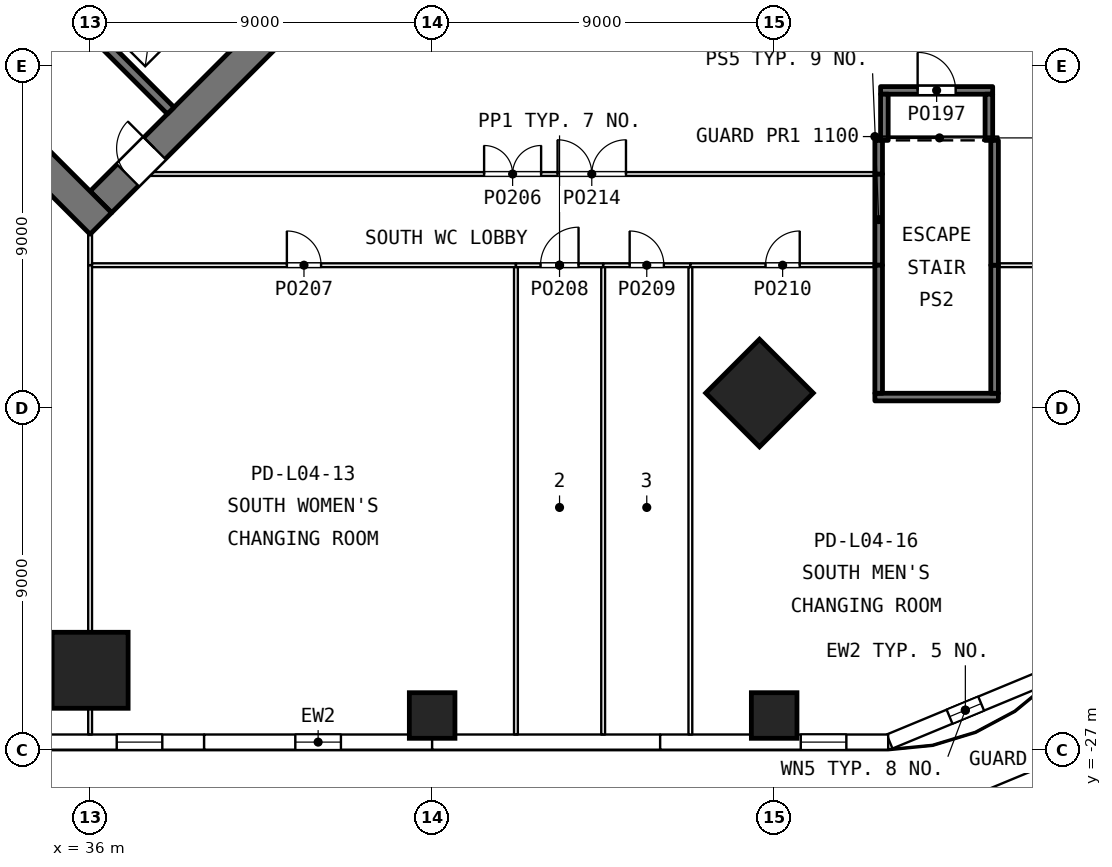
"""IFC4 building model, lengths in metres.
Left out: names, types, materials, properties, quantities, classifications, styles, units other than length and angle.
Written with IfcOpenShell. Run it as: python <this file> out.ifc"""

import sys

from ifc_helpers import new_model, si_unit, direction, frame, frame_2d, origin, origin_2d, place, context, subcontext, project, spatial, rectangle, extrude, element, fill, save


model = new_model("IFC4")
c1 = context("Model", 3, precision=1e-05, world=origin(), true_north=direction((0.0, 1.0)))
c2 = subcontext(c1, "Body", "Model", "MODEL_VIEW")
j1 = project(units=[si_unit("LENGTHUNIT", "METRE"), si_unit("PLANEANGLEUNIT", "RADIAN")], contexts=[c1])
p1 = place(None, origin())
s1 = spatial("IfcSite", under=j1, at=p1, CompositionType="ELEMENT")
p2 = place(p1, origin())
s2 = spatial("IfcBuilding", under=s1, at=p2, CompositionType="ELEMENT")
p3 = place(p2, frame((0.0, 0.0, 22.8)))
s3 = spatial("IfcBuildingStorey", under=s2, at=p3, CompositionType="ELEMENT", Elevation=22.8)
for number, where, z_axis, x_axis in (
    (1, (45.0, -26.1, 0.0), (0.0, 0.0, 1.0), (1.0, 0.0, 0.0)),
    (2, (54.0, -26.1, 0.0), (0.0, 0.0, 1.0), (1.0, 0.0, 0.0)),
):
    element("IfcColumn", number, at=place(p3, frame(where, z_axis=z_axis, x_axis=x_axis)), inside=s3, PredefinedType="COLUMN", context=c2, shape_type="SweptSolid", body=[
        extrude(rectangle(XDim=1.2, YDim=1.2, at=origin_2d()), origin(), (0.0, 0.0, 1.0), 4.8),
    ])
for number, where, z_axis, x_axis in (
    (3, (36.0, -24.91, 0.0), (0.0, 0.0, 1.0), (0.0, -1.0, 0.0)),
    (4, (53.614, -17.614, 0.0), (0.0, 0.0, 1.0), (0.707, -0.707, 0.0)),
):
    element("IfcColumn", number, at=place(p3, frame(where, z_axis=z_axis, x_axis=x_axis)), inside=s3, PredefinedType="COLUMN", context=c2, shape_type="SweptSolid", body=[
        extrude(rectangle(XDim=2.0, YDim=2.0, at=origin_2d()), origin(), (0.0, 0.0, 1.0), 4.8),
    ])
p4 = place(p3, frame((57.037, -26.785, 0.0), z_axis=(0.0, 0.0, 1.0), x_axis=(0.923854820772, 0.382743086333, 0.0)))
e5 = element("IfcWall", 5, at=p4, inside=s3, PredefinedType="SOLIDWALL", context=c2, shape_type="SweptSolid", body=[
    extrude(rectangle(XDim=4.316, YDim=0.4, at=frame_2d((2.158, 0.0))), origin(), (0.0, 0.0, 1.0), 4.5),
])
p5 = place(p4, frame((1.708, 0.0, 1.0)))
e6 = element("IfcOpeningElement", 6, at=p5, cuts=e5, PredefinedType="OPENING", context=c2, shape_type="SweptSolid", body=[
    extrude(rectangle(XDim=0.9, YDim=2.4, at=frame_2d((0.45, 1.2))), frame((0.0, 0.21, 0.0), z_axis=(0.0, -1.0, 0.0), x_axis=(1.0, 0.0, 0.0)), (0.0, 0.0, 1.0), 0.42),
])
p6 = place(p3, frame((33.0, -26.8, 0.0), z_axis=(0.0, 0.0, 1.0), x_axis=(1.0, 0.0, 0.0)))
e7 = element("IfcWall", 7, at=p6, inside=s3, PredefinedType="SOLIDWALL", context=c2, shape_type="SweptSolid", body=[
    extrude(rectangle(XDim=6.0, YDim=0.4, at=frame_2d((3.0, 0.0))), origin(), (0.0, 0.0, 1.0), 4.5),
])
p7 = place(p6, frame((3.7, 0.0, 1.1)))
e8 = element("IfcOpeningElement", 8, at=p7, cuts=e7, PredefinedType="OPENING", context=c2, shape_type="SweptSolid", body=[
    extrude(rectangle(XDim=1.2, YDim=1.8, at=frame_2d((0.6, 0.9))), frame((0.0, 0.21, 0.0), z_axis=(0.0, -1.0, 0.0), x_axis=(1.0, 0.0, 0.0)), (0.0, 0.0, 1.0), 0.42),
])
p8 = place(p3, frame((39.0, -26.8, 0.0), z_axis=(0.0, 0.0, 1.0), x_axis=(1.0, 0.0, 0.0)))
e9 = element("IfcWall", 9, at=p8, inside=s3, PredefinedType="SOLIDWALL", context=c2, shape_type="SweptSolid", body=[
    extrude(rectangle(XDim=6.0, YDim=0.4, at=frame_2d((3.0, 0.0))), origin(), (0.0, 0.0, 1.0), 4.5),
])
p9 = place(p8, frame((2.4, 0.0, 1.1)))
e10 = element("IfcOpeningElement", 10, at=p9, cuts=e9, PredefinedType="OPENING", context=c2, shape_type="SweptSolid", body=[
    extrude(rectangle(XDim=1.2, YDim=1.8, at=frame_2d((0.6, 0.9))), frame((0.0, 0.21, 0.0), z_axis=(0.0, -1.0, 0.0), x_axis=(1.0, 0.0, 0.0)), (0.0, 0.0, 1.0), 0.42),
])
p10 = place(p3, frame((45.0, -26.8, 0.0), z_axis=(0.0, 0.0, 1.0), x_axis=(1.0, 0.0, 0.0)))
e11 = element("IfcWall", 11, at=p10, inside=s3, PredefinedType="SOLIDWALL", context=c2, shape_type="SweptSolid", body=[
    extrude(rectangle(XDim=6.0, YDim=0.4, at=frame_2d((3.0, 0.0))), origin(), (0.0, 0.0, 1.0), 4.5),
])
p11 = place(p3, frame((51.0, -26.8, 0.0), z_axis=(0.0, 0.0, 1.0), x_axis=(1.0, 0.0, 0.0)))
e12 = element("IfcWall", 12, at=p11, inside=s3, PredefinedType="SOLIDWALL", context=c2, shape_type="SweptSolid", body=[
    extrude(rectangle(XDim=6.0, YDim=0.4, at=frame_2d((3.0, 0.0))), origin(), (0.0, 0.0, 1.0), 4.5),
])
p12 = place(p11, frame((3.7, 0.0, 1.1)))
e13 = element("IfcOpeningElement", 13, at=p12, cuts=e12, PredefinedType="OPENING", context=c2, shape_type="SweptSolid", body=[
    extrude(rectangle(XDim=1.2, YDim=1.8, at=frame_2d((0.6, 0.9))), frame((0.0, 0.21, 0.0), z_axis=(0.0, -1.0, 0.0), x_axis=(1.0, 0.0, 0.0)), (0.0, 0.0, 1.0), 0.42),
])
p13 = place(p3, frame((36.283, -12.586, 0.0), z_axis=(0.0, 0.0, 1.0), x_axis=(0.707106781187, 0.707106781187, 0.0)))
e14 = element("IfcWall", 14, at=p13, inside=s3, PredefinedType="SHEAR", context=c2, shape_type="SweptSolid", body=[
    extrude(rectangle(XDim=17.4, YDim=0.8, at=frame_2d((8.7, 0.0))), origin(), (0.0, 0.0, 1.0), 4.5),
])
p14 = place(p13, frame((7.3, 0.0, 0.0)))
e15 = element("IfcOpeningElement", 15, at=p14, cuts=e14, PredefinedType="OPENING", context=c2, shape_type="SweptSolid", body=[
    extrude(rectangle(XDim=1.2, YDim=2.1, at=frame_2d((0.6, 1.05))), frame((0.0, 0.41, 0.0), z_axis=(0.0, -1.0, 0.0), x_axis=(1.0, 0.0, 0.0)), (0.0, 0.0, 1.0), 0.82),
])
p15 = place(p13, frame((1.0, 0.0, 0.0)))
e16 = element("IfcOpeningElement", 16, at=p15, cuts=e14, PredefinedType="OPENING", context=c2, shape_type="SweptSolid", body=[
    extrude(rectangle(XDim=1.0, YDim=2.1, at=frame_2d((0.5, 1.05))), frame((0.0, 0.41, 0.0), z_axis=(0.0, -1.0, 0.0), x_axis=(1.0, 0.0, 0.0)), (0.0, 0.0, 1.0), 0.82),
])
p16 = place(p3, frame((33.207, -9.51, 0.0), z_axis=(0.0, 0.0, 1.0), x_axis=(0.707106781187, 0.707106781187, 0.0)))
e17 = element("IfcWall", 17, at=p16, inside=s3, PredefinedType="SHEAR", context=c2, shape_type="SweptSolid", body=[
    extrude(rectangle(XDim=17.4, YDim=0.25, at=frame_2d((8.7, 0.0))), origin(), (0.0, 0.0, 1.0), 4.5),
])
p17 = place(p3, frame((36.283, -13.152, 0.0), z_axis=(0.0, 0.0, 1.0), x_axis=(-0.707106781187, 0.707106781187, 0.0)))
e18 = element("IfcWall", 18, at=p17, inside=s3, PredefinedType="SHEAR", context=c2, shape_type="SweptSolid", body=[
    extrude(rectangle(XDim=19.0, YDim=0.8, at=frame_2d((9.5, 0.0))), origin(), (0.0, 0.0, 1.0), 4.5),
])
p18 = place(p17, frame((8.3, 0.0, 0.0)))
e19 = element("IfcOpeningElement", 19, at=p18, cuts=e18, PredefinedType="OPENING", context=c2, shape_type="SweptSolid", body=[
    extrude(rectangle(XDim=2.4, YDim=2.1, at=frame_2d((1.2, 1.05))), frame((0.0, 0.41, 0.0), z_axis=(0.0, -1.0, 0.0), x_axis=(1.0, 0.0, 0.0)), (0.0, 0.0, 1.0), 0.82),
])
p19 = place(p3, frame((38.121, -10.182, 0.0), z_axis=(0.0, 0.0, 1.0), x_axis=(-0.707138693938, 0.707074866995, 0.0)))
e20 = element("IfcWall", 20, at=p19, inside=s3, PredefinedType="SHEAR", context=c2, shape_type="SweptSolid", body=[
    extrude(rectangle(XDim=3.825, YDim=0.25, at=frame_2d((1.913, 0.0))), origin(), (0.0, 0.0, 1.0), 4.5),
])
p20 = place(p3, frame((56.75, -14.25, 0.0), z_axis=(0.0, 0.0, 1.0), x_axis=(0.0, 1.0, 0.0)))
e21 = element("IfcWall", 21, at=p20, inside=s3, PredefinedType="SOLIDWALL", context=c2, shape_type="SweptSolid", body=[
    extrude(rectangle(XDim=2.4, YDim=0.2, at=frame_2d((1.2, 0.0))), origin(), (0.0, 0.0, 1.0), 4.5),
])
p21 = place(p3, frame((56.65, -17.72, 0.0), z_axis=(0.0, 0.0, 1.0), x_axis=(1.0, 0.0, 0.0)))
e22 = element("IfcWall", 22, at=p21, inside=s3, PredefinedType="SOLIDWALL", context=c2, shape_type="SweptSolid", body=[
    extrude(rectangle(XDim=3.25, YDim=0.2, at=frame_2d((1.625, 0.0))), origin(), (0.0, 0.0, 1.0), 4.5),
])
for number, where, z_axis, x_axis in (
    (23, (56.75, -17.62, 0.0), (0.0, 0.0, 1.0), (0.0, 1.0, 0.0)),
    (24, (59.8, -17.62, 0.0), (0.0, 0.0, 1.0), (0.0, 1.0, 0.0)),
):
    element("IfcWall", number, at=place(p3, frame(where, z_axis=z_axis, x_axis=x_axis)), inside=s3, PredefinedType="SOLIDWALL", context=c2, shape_type="SweptSolid", body=[
        extrude(rectangle(XDim=3.37, YDim=0.2, at=frame_2d((1.685, 0.0))), origin(), (0.0, 0.0, 1.0), 4.5),
    ])
p22 = place(p3, frame((56.8, -9.65, 0.0), z_axis=(0.0, 0.0, 1.0), x_axis=(1.0, 0.0, 0.0)))
e25 = element("IfcWall", 25, at=p22, inside=s3, PredefinedType="SOLIDWALL", context=c2, shape_type="SweptSolid", body=[
    extrude(rectangle(XDim=2.95, YDim=0.2, at=frame_2d((1.475, 0.0))), origin(), (0.0, 0.0, 1.0), 4.5),
])
p23 = place(p22, frame((0.975, 0.0, 0.0)))
e26 = element("IfcOpeningElement", 26, at=p23, cuts=e25, PredefinedType="OPENING", context=c2, shape_type="SweptSolid", body=[
    extrude(rectangle(XDim=1.0, YDim=2.1, at=frame_2d((0.5, 1.05))), frame((0.0, 0.11, 0.0), z_axis=(0.0, -1.0, 0.0), x_axis=(1.0, 0.0, 0.0)), (0.0, 0.0, 1.0), 0.22),
])
p24 = place(p3, frame((56.75, -11.85, 0.0), z_axis=(0.0, 0.0, 1.0), x_axis=(0.0, 1.0, 0.0)))
e27 = element("IfcWall", 27, at=p24, inside=s3, PredefinedType="SOLIDWALL", context=c2, shape_type="SweptSolid", body=[
    extrude(rectangle(XDim=0.885, YDim=0.2, at=frame_2d((0.442, 0.0))), origin(), (0.0, 0.0, 1.0), 4.5),
])
for number, where, z_axis, x_axis in (
    (28, (56.9, -10.965, 0.0), (0.0, 0.0, 1.0), (0.0, 1.0, 0.0)),
    (29, (59.65, -10.965, 0.0), (0.0, 0.0, 1.0), (0.0, 1.0, 0.0)),
):
    element("IfcWall", number, at=place(p3, frame(where, z_axis=z_axis, x_axis=x_axis)), inside=s3, PredefinedType="SOLIDWALL", context=c2, shape_type="SweptSolid", body=[
        extrude(rectangle(XDim=1.215, YDim=0.2, at=frame_2d((0.607, 0.0))), origin(), (0.0, 0.0, 1.0), 4.5),
    ])
p25 = place(p3, frame((59.8, -14.25, 0.0), z_axis=(0.0, 0.0, 1.0), x_axis=(0.0, 1.0, 0.0)))
e30 = element("IfcWall", 30, at=p25, inside=s3, PredefinedType="SOLIDWALL", context=c2, shape_type="SweptSolid", body=[
    extrude(rectangle(XDim=3.285, YDim=0.2, at=frame_2d((1.643, 0.0))), origin(), (0.0, 0.0, 1.0), 4.5),
])
p26 = place(p3, frame((36.0, -14.25, 0.0), z_axis=(0.0, 0.0, 1.0), x_axis=(0.0, 1.0, 0.0)))
e31 = element("IfcWall", 31, at=p26, inside=s3, PredefinedType="PARTITIONING", context=c2, shape_type="SweptSolid", body=[
    extrude(rectangle(XDim=0.815, YDim=0.1, at=frame_2d((0.407, 0.0))), origin(), (0.0, 0.0, 1.0), 4.5),
])
p27 = place(p3, frame((36.0, -26.6, 0.0), z_axis=(0.0, 0.0, 1.0), x_axis=(0.0, 1.0, 0.0)))
e32 = element("IfcWall", 32, at=p27, inside=s3, PredefinedType="PARTITIONING", context=c2, shape_type="SweptSolid", body=[
    extrude(rectangle(XDim=12.35, YDim=0.1, at=frame_2d((6.175, 0.0))), origin(), (0.0, 0.0, 1.0), 3.9),
])
p28 = place(p3, frame((36.05, -14.25, 0.0), z_axis=(0.0, 0.0, 1.0), x_axis=(1.0, 0.0, 0.0)))
e33 = element("IfcWall", 33, at=p28, inside=s3, PredefinedType="PARTITIONING", context=c2, shape_type="SweptSolid", body=[
    extrude(rectangle(XDim=11.155, YDim=0.1, at=frame_2d((5.578, 0.0))), origin(), (0.0, 0.0, 1.0), 4.5),
])
p29 = place(p28, frame((5.127, 0.0, 0.0)))
e34 = element("IfcOpeningElement", 34, at=p29, cuts=e33, PredefinedType="OPENING", context=c2, shape_type="SweptSolid", body=[
    extrude(rectangle(XDim=0.9, YDim=2.1, at=frame_2d((0.45, 1.05))), frame((0.0, 0.06, 0.0), z_axis=(0.0, -1.0, 0.0), x_axis=(1.0, 0.0, 0.0)), (0.0, 0.0, 1.0), 0.12),
])
p30 = place(p3, frame((47.205, -14.25, 0.0), z_axis=(0.0, 0.0, 1.0), x_axis=(1.0, 0.0, 0.0)))
e35 = element("IfcWall", 35, at=p30, inside=s3, PredefinedType="PARTITIONING", context=c2, shape_type="SweptSolid", body=[
    extrude(rectangle(XDim=2.295, YDim=0.1, at=frame_2d((1.147, 0.0))), origin(), (0.0, 0.0, 1.0), 4.5),
])
p31 = place(p30, frame((0.647, 0.0, 0.0)))
e36 = element("IfcOpeningElement", 36, at=p31, cuts=e35, PredefinedType="OPENING", context=c2, shape_type="SweptSolid", body=[
    extrude(rectangle(XDim=1.0, YDim=2.1, at=frame_2d((0.5, 1.05))), frame((0.0, 0.06, 0.0), z_axis=(0.0, -1.0, 0.0), x_axis=(1.0, 0.0, 0.0)), (0.0, 0.0, 1.0), 0.12),
])
p32 = place(p3, frame((49.5, -14.25, 0.0), z_axis=(0.0, 0.0, 1.0), x_axis=(1.0, 0.0, 0.0)))
e37 = element("IfcWall", 37, at=p32, inside=s3, PredefinedType="PARTITIONING", context=c2, shape_type="SweptSolid", body=[
    extrude(rectangle(XDim=2.295, YDim=0.1, at=frame_2d((1.147, 0.0))), origin(), (0.0, 0.0, 1.0), 4.5),
])
p33 = place(p32, frame((0.698, 0.0, 0.0)))
e38 = element("IfcOpeningElement", 38, at=p33, cuts=e37, PredefinedType="OPENING", context=c2, shape_type="SweptSolid", body=[
    extrude(rectangle(XDim=0.9, YDim=2.1, at=frame_2d((0.45, 1.05))), frame((0.0, 0.06, 0.0), z_axis=(0.0, -1.0, 0.0), x_axis=(1.0, 0.0, 0.0)), (0.0, 0.0, 1.0), 0.12),
])
p34 = place(p3, frame((51.795, -14.25, 0.0), z_axis=(0.0, 0.0, 1.0), x_axis=(1.0, 0.0, 0.0)))
e39 = element("IfcWall", 39, at=p34, inside=s3, PredefinedType="PARTITIONING", context=c2, shape_type="SweptSolid", body=[
    extrude(rectangle(XDim=4.855, YDim=0.1, at=frame_2d((2.427, 0.0))), origin(), (0.0, 0.0, 1.0), 4.5),
])
p35 = place(p34, frame((1.978, 0.0, 0.0)))
e40 = element("IfcOpeningElement", 40, at=p35, cuts=e39, PredefinedType="OPENING", context=c2, shape_type="SweptSolid", body=[
    extrude(rectangle(XDim=0.9, YDim=2.1, at=frame_2d((0.45, 1.05))), frame((0.0, 0.06, 0.0), z_axis=(0.0, -1.0, 0.0), x_axis=(1.0, 0.0, 0.0)), (0.0, 0.0, 1.0), 0.12),
])
p36 = place(p3, frame((37.585, -11.85, 0.0), z_axis=(0.0, 0.0, 1.0), x_axis=(1.0, 0.0, 0.0)))
e41 = element("IfcWall", 41, at=p36, inside=s3, PredefinedType="PARTITIONING", context=c2, shape_type="SweptSolid", body=[
    extrude(rectangle(XDim=19.065, YDim=0.1, at=frame_2d((9.532, 0.0))), origin(), (0.0, 0.0, 1.0), 4.5),
])
p37 = place(p36, frame((8.782, 0.0, 0.0)))
e42 = element("IfcOpeningElement", 42, at=p37, cuts=e41, PredefinedType="OPENING", context=c2, shape_type="SweptSolid", body=[
    extrude(rectangle(XDim=1.5, YDim=2.1, at=frame_2d((0.75, 1.05))), frame((0.0, 0.06, 0.0), z_axis=(0.0, -1.0, 0.0), x_axis=(1.0, 0.0, 0.0)), (0.0, 0.0, 1.0), 0.12),
])
p38 = place(p36, frame((10.716, 0.0, 0.0)))
e43 = element("IfcOpeningElement", 43, at=p38, cuts=e41, PredefinedType="OPENING", context=c2, shape_type="SweptSolid", body=[
    extrude(rectangle(XDim=1.8, YDim=2.1, at=frame_2d((0.9, 1.05))), frame((0.0, 0.06, 0.0), z_axis=(0.0, -1.0, 0.0), x_axis=(1.0, 0.0, 0.0)), (0.0, 0.0, 1.0), 0.12),
])
for number, where, z_axis, x_axis in (
    (44, (47.205, -26.6, 0.0), (0.0, 0.0, 1.0), (0.0, 1.0, 0.0)),
    (45, (49.5, -26.6, 0.0), (0.0, 0.0, 1.0), (0.0, 1.0, 0.0)),
    (46, (51.795, -26.6, 0.0), (0.0, 0.0, 1.0), (0.0, 1.0, 0.0)),
):
    element("IfcWall", number, at=place(p3, frame(where, z_axis=z_axis, x_axis=x_axis)), inside=s3, PredefinedType="PARTITIONING", context=c2, shape_type="SweptSolid", body=[
        extrude(rectangle(XDim=12.3, YDim=0.1, at=frame_2d((6.15, 0.0))), origin(), (0.0, 0.0, 1.0), 4.5),
    ])
p39 = place(p3, frame((59.9, -14.25, 0.0), z_axis=(0.0, 0.0, 1.0), x_axis=(1.0, 0.0, 0.0)))
e47 = element("IfcWall", 47, at=p39, inside=s3, PredefinedType="PARTITIONING", context=c2, shape_type="SweptSolid", body=[
    extrude(rectangle(XDim=2.7, YDim=0.1, at=frame_2d((1.35, 0.0))), origin(), (0.0, 0.0, 1.0), 4.5),
])
p40 = place(p5, origin())
e48 = element("IfcWindow", 48, at=p40, inside=s3, PartitioningType="SINGLE_PANEL", PredefinedType="WINDOW", context=c2, shape_type="SweptSolid", body=[
    extrude(rectangle(XDim=0.9, YDim=2.4, at=frame_2d((0.45, 1.2))), frame((0.0, 0.03, 0.0), z_axis=(0.0, -1.0, 0.0), x_axis=(1.0, 0.0, 0.0)), (0.0, 0.0, 1.0), 0.06),
])
fill(e6, e48)
p41 = place(p7, origin())
e49 = element("IfcWindow", 49, at=p41, inside=s3, PartitioningType="SINGLE_PANEL", PredefinedType="WINDOW", context=c2, shape_type="SweptSolid", body=[
    extrude(rectangle(XDim=1.2, YDim=1.8, at=frame_2d((0.6, 0.9))), frame((0.0, 0.03, 0.0), z_axis=(0.0, -1.0, 0.0), x_axis=(1.0, 0.0, 0.0)), (0.0, 0.0, 1.0), 0.06),
])
fill(e8, e49)
p42 = place(p9, origin())
e50 = element("IfcWindow", 50, at=p42, inside=s3, PartitioningType="SINGLE_PANEL", PredefinedType="WINDOW", context=c2, shape_type="SweptSolid", body=[
    extrude(rectangle(XDim=1.2, YDim=1.8, at=frame_2d((0.6, 0.9))), frame((0.0, 0.03, 0.0), z_axis=(0.0, -1.0, 0.0), x_axis=(1.0, 0.0, 0.0)), (0.0, 0.0, 1.0), 0.06),
])
fill(e10, e50)
p43 = place(p12, origin())
e51 = element("IfcWindow", 51, at=p43, inside=s3, PartitioningType="SINGLE_PANEL", PredefinedType="WINDOW", context=c2, shape_type="SweptSolid", body=[
    extrude(rectangle(XDim=1.2, YDim=1.8, at=frame_2d((0.6, 0.9))), frame((0.0, 0.03, 0.0), z_axis=(0.0, -1.0, 0.0), x_axis=(1.0, 0.0, 0.0)), (0.0, 0.0, 1.0), 0.06),
])
fill(e13, e51)
p44 = place(p15, origin())
e52 = element("IfcDoor", 52, at=p44, inside=s3, OperationType="SINGLE_SWING_RIGHT", PredefinedType="DOOR", context=c2, shape_type="SweptSolid", body=[
    extrude(rectangle(XDim=1.0, YDim=2.1, at=frame_2d((0.5, 1.05))), frame((0.0, 0.275, 0.0), z_axis=(0.0, -1.0, 0.0), x_axis=(1.0, 0.0, 0.0)), (0.0, 0.0, 1.0), 0.05),
])
fill(e16, e52)
p45 = place(p23, origin())
e53 = element("IfcDoor", 53, at=p45, inside=s3, OperationType="SINGLE_SWING_LEFT", PredefinedType="DOOR", context=c2, shape_type="SweptSolid", body=[
    extrude(rectangle(XDim=1.0, YDim=2.1, at=frame_2d((0.5, 1.05))), frame((0.0, 0.025, 0.0), z_axis=(0.0, -1.0, 0.0), x_axis=(1.0, 0.0, 0.0)), (0.0, 0.0, 1.0), 0.05),
])
fill(e26, e53)
p46 = place(p37, origin())
e54 = element("IfcDoor", 54, at=p46, inside=s3, OperationType="DOUBLE_DOOR_DOUBLE_SWING", PredefinedType="DOOR", context=c2, shape_type="SweptSolid", body=[
    extrude(rectangle(XDim=1.5, YDim=2.1, at=frame_2d((0.75, 1.05))), frame((0.0, 0.025, 0.0), z_axis=(0.0, -1.0, 0.0), x_axis=(1.0, 0.0, 0.0)), (0.0, 0.0, 1.0), 0.05),
])
fill(e42, e54)
p47 = place(p29, origin())
e55 = element("IfcDoor", 55, at=p47, inside=s3, OperationType="SINGLE_SWING_LEFT", PredefinedType="DOOR", context=c2, shape_type="SweptSolid", body=[
    extrude(rectangle(XDim=0.9, YDim=2.1, at=frame_2d((0.45, 1.05))), frame((0.0, 0.025, 0.0), z_axis=(0.0, -1.0, 0.0), x_axis=(1.0, 0.0, 0.0)), (0.0, 0.0, 1.0), 0.05),
])
fill(e34, e55)
p48 = place(p31, origin())
e56 = element("IfcDoor", 56, at=p48, inside=s3, OperationType="SINGLE_SWING_RIGHT", PredefinedType="DOOR", context=c2, shape_type="SweptSolid", body=[
    extrude(rectangle(XDim=1.0, YDim=2.1, at=frame_2d((0.5, 1.05))), frame((0.0, 0.025, 0.0), z_axis=(0.0, -1.0, 0.0), x_axis=(1.0, 0.0, 0.0)), (0.0, 0.0, 1.0), 0.05),
])
fill(e36, e56)
p49 = place(p33, origin())
e57 = element("IfcDoor", 57, at=p49, inside=s3, OperationType="SINGLE_SWING_LEFT", PredefinedType="DOOR", context=c2, shape_type="SweptSolid", body=[
    extrude(rectangle(XDim=0.9, YDim=2.1, at=frame_2d((0.45, 1.05))), frame((0.0, 0.025, 0.0), z_axis=(0.0, -1.0, 0.0), x_axis=(1.0, 0.0, 0.0)), (0.0, 0.0, 1.0), 0.05),
])
fill(e38, e57)
p50 = place(p35, origin())
e58 = element("IfcDoor", 58, at=p50, inside=s3, OperationType="SINGLE_SWING_RIGHT", PredefinedType="DOOR", context=c2, shape_type="SweptSolid", body=[
    extrude(rectangle(XDim=0.9, YDim=2.1, at=frame_2d((0.45, 1.05))), frame((0.0, 0.025, 0.0), z_axis=(0.0, -1.0, 0.0), x_axis=(1.0, 0.0, 0.0)), (0.0, 0.0, 1.0), 0.05),
])
fill(e40, e58)
p51 = place(p38, origin())
e59 = element("IfcDoor", 59, at=p51, inside=s3, OperationType="DOUBLE_DOOR_DOUBLE_SWING", PredefinedType="DOOR", context=c2, shape_type="SweptSolid", body=[
    extrude(rectangle(XDim=1.8, YDim=2.1, at=frame_2d((0.9, 1.05))), frame((0.0, 0.025, 0.0), z_axis=(0.0, -1.0, 0.0), x_axis=(1.0, 0.0, 0.0)), (0.0, 0.0, 1.0), 0.05),
])
fill(e43, e59)
save(model, sys.argv[1])
